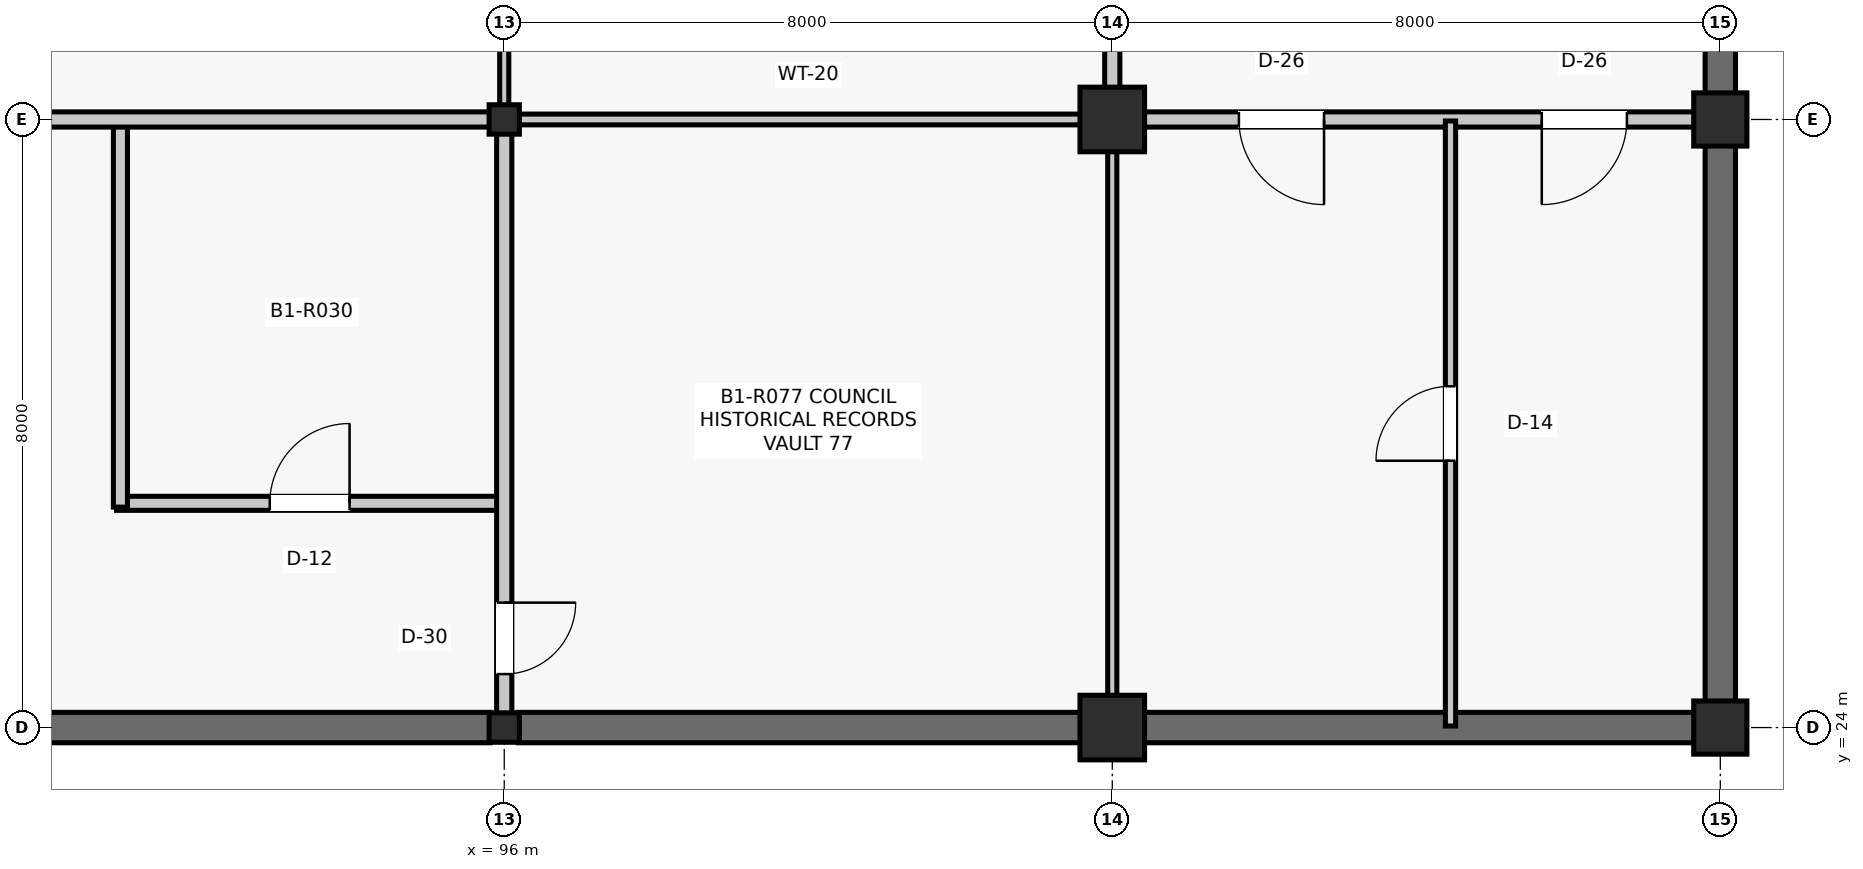
"""IFC4 building model, lengths in metres.
Left out: names, types, materials, properties, quantities, classifications, styles, units other than length and angle.
Written with IfcOpenShell. Run it as: python <this file> out.ifc"""

import sys

from ifc_helpers import new_model, si_unit, direction, frame, frame_2d, origin, origin_2d, place, context, subcontext, project, spatial, rectangle, i_section, extrude, element, fill, save


model = new_model("IFC4")
c1 = context("Model", 3, precision=1e-05, world=origin(), true_north=direction((0.0, 1.0)))
c2 = subcontext(c1, "Body", "Model", "MODEL_VIEW")
j1 = project(units=[si_unit("LENGTHUNIT", "METRE"), si_unit("PLANEANGLEUNIT", "RADIAN")], contexts=[c1])
p1 = place(None, origin())
s1 = spatial("IfcSite", under=j1, at=p1, CompositionType="ELEMENT")
p2 = place(p1, origin())
s2 = spatial("IfcBuilding", under=s1, at=p2, CompositionType="ELEMENT")
p3 = place(p2, frame((0.0, 0.0, -4.29)))
s3 = spatial("IfcBuildingStorey", under=s2, at=p3, CompositionType="ELEMENT", Elevation=-4.29)
for number, where, z_axis, x_axis in (
    (1, (96.0, 24.0, 0.0), (0.0, 0.0, 1.0), (1.0, 0.0, 0.0)),
    (2, (96.0, 32.0, 0.0), (0.0, 0.0, 1.0), (1.0, 0.0, 0.0)),
):
    element("IfcColumn", number, at=place(p3, frame(where, z_axis=z_axis, x_axis=x_axis)), inside=s3, PredefinedType="COLUMN", context=c2, shape_type="SweptSolid", body=[
        extrude(i_section(OverallWidth=0.398, OverallDepth=0.387, WebThickness=0.021, FlangeThickness=0.033, FilletRadius=0.015, at=origin_2d()), origin(), (0.0, 0.0, 1.0), 4.29),
    ])
for number, where, z_axis, x_axis in (
    (3, (104.0, 24.0, 0.0), (0.0, 0.0, 1.0), (1.0, 0.0, 0.0)),
    (4, (104.0, 32.0, 0.0), (0.0, 0.0, 1.0), (1.0, 0.0, 0.0)),
):
    element("IfcColumn", number, at=place(p3, frame(where, z_axis=z_axis, x_axis=x_axis)), inside=s3, PredefinedType="COLUMN", context=c2, shape_type="SweptSolid", body=[
        extrude(rectangle(XDim=0.85, YDim=0.85, at=origin_2d()), origin(), (0.0, 0.0, 1.0), 4.29),
    ])
for number, where, z_axis, x_axis in (
    (5, (112.0, 24.0, 0.0), (0.0, 0.0, 1.0), (1.0, 0.0, 0.0)),
    (6, (112.0, 32.0, 0.0), (0.0, 0.0, 1.0), (1.0, 0.0, 0.0)),
):
    element("IfcColumn", number, at=place(p3, frame(where, z_axis=z_axis, x_axis=x_axis)), inside=s3, PredefinedType="COLUMN", context=c2, shape_type="SweptSolid", body=[
        extrude(rectangle(XDim=0.7, YDim=0.7, at=origin_2d()), origin(), (0.0, 0.0, 1.0), 4.29),
    ])
p4 = place(p3, frame((88.335, 24.0, 0.0), z_axis=(0.0, 0.0, 1.0), x_axis=(1.0, 0.0, 0.0)))
e7 = element("IfcWall", 7, at=p4, inside=s3, PredefinedType="SHEAR", context=c2, shape_type="SweptSolid", body=[
    extrude(rectangle(XDim=7.481, YDim=0.4, at=frame_2d((3.74, 0.0))), origin(), (0.0, 0.0, 1.0), 3.333),
])
p5 = place(p3, frame((96.184, 24.0, 0.0), z_axis=(0.0, 0.0, 1.0), x_axis=(1.0, 0.0, 0.0)))
e8 = element("IfcWall", 8, at=p5, inside=s3, PredefinedType="SHEAR", context=c2, shape_type="SweptSolid", body=[
    extrude(rectangle(XDim=7.406, YDim=0.4, at=frame_2d((3.703, 0.0))), origin(), (0.0, 0.0, 1.0), 3.401),
])
p6 = place(p3, frame((104.41, 24.0, 0.0), z_axis=(0.0, 0.0, 1.0), x_axis=(1.0, 0.0, 0.0)))
e9 = element("IfcWall", 9, at=p6, inside=s3, PredefinedType="SHEAR", context=c2, shape_type="SweptSolid", body=[
    extrude(rectangle(XDim=7.255, YDim=0.4, at=frame_2d((3.627, 0.0))), origin(), (0.0, 0.0, 1.0), 3.324),
])
p7 = place(p3, frame((112.0, 24.335, 0.0), z_axis=(0.0, 0.0, 1.0), x_axis=(0.0, 1.0, 0.0)))
e10 = element("IfcWall", 10, at=p7, inside=s3, PredefinedType="SHEAR", context=c2, shape_type="SweptSolid", body=[
    extrude(rectangle(XDim=7.33, YDim=0.4, at=frame_2d((3.665, 0.0))), origin(), (0.0, 0.0, 1.0), 3.409),
])
p8 = place(p3, frame((112.0, 32.335, 0.0), z_axis=(0.0, 0.0, 1.0), x_axis=(0.0, 1.0, 0.0)))
e11 = element("IfcWall", 11, at=p8, inside=s3, PredefinedType="SHEAR", context=c2, shape_type="SweptSolid", body=[
    extrude(rectangle(XDim=7.33, YDim=0.4, at=frame_2d((3.665, 0.0))), origin(), (0.0, 0.0, 1.0), 3.401),
])
p9 = place(p3, frame((90.9, 26.95, 0.0), z_axis=(0.0, 0.0, 1.0), x_axis=(1.0, 0.0, 0.0)))
e12 = element("IfcWall", 12, at=p9, inside=s3, PredefinedType="PARTITIONING", context=c2, shape_type="SweptSolid", body=[
    extrude(rectangle(XDim=5.08, YDim=0.185, at=frame_2d((2.54, 0.0))), origin(), (0.0, 0.0, 1.0), 3.461),
])
p10 = place(p9, frame((2.015, 0.0, 0.0)))
e13 = element("IfcOpeningElement", 13, at=p10, cuts=e12, PredefinedType="OPENING", context=c2, shape_type="SweptSolid", body=[
    extrude(rectangle(XDim=1.05, YDim=2.15, at=frame_2d((0.525, 1.075))), frame((0.0, 0.103, 0.0), z_axis=(0.0, -1.0, 0.0), x_axis=(1.0, 0.0, 0.0)), (0.0, 0.0, 1.0), 0.205),
])
p11 = place(p3, frame((90.95, 26.9, 0.0), z_axis=(0.0, 0.0, 1.0), x_axis=(0.0, 1.0, 0.0)))
e14 = element("IfcWall", 14, at=p11, inside=s3, PredefinedType="PARTITIONING", context=c2, shape_type="SweptSolid", body=[
    extrude(rectangle(XDim=5.08, YDim=0.185, at=frame_2d((2.54, 0.0))), origin(), (0.0, 0.0, 1.0), 3.394),
])
p12 = place(p3, frame((96.0, 24.184, 0.0), z_axis=(0.0, 0.0, 1.0), x_axis=(0.0, 1.0, 0.0)))
e15 = element("IfcWall", 15, at=p12, inside=s3, PredefinedType="PARTITIONING", context=c2, shape_type="SweptSolid", body=[
    extrude(rectangle(XDim=7.633, YDim=0.2, at=frame_2d((3.816, 0.0))), origin(), (0.0, 0.0, 1.0), 3.461),
])
p13 = place(p12, frame((0.52, 0.0, 0.0)))
e16 = element("IfcOpeningElement", 16, at=p13, cuts=e15, PredefinedType="OPENING", context=c2, shape_type="SweptSolid", body=[
    extrude(rectangle(XDim=0.94, YDim=2.12, at=frame_2d((0.47, 1.06))), frame((0.0, 0.11, 0.0), z_axis=(0.0, -1.0, 0.0), x_axis=(1.0, 0.0, 0.0)), (0.0, 0.0, 1.0), 0.22),
])
p14 = place(p3, frame((88.34, 32.0, 0.0), z_axis=(0.0, 0.0, 1.0), x_axis=(1.0, 0.0, 0.0)))
e17 = element("IfcWall", 17, at=p14, inside=s3, PredefinedType="PARTITIONING", context=c2, shape_type="SweptSolid", body=[
    extrude(rectangle(XDim=7.471, YDim=0.2, at=frame_2d((3.735, 0.0))), origin(), (0.0, 0.0, 1.0), 3.394),
])
p15 = place(p14, frame((0.52, 0.0, 0.0)))
e18 = element("IfcOpeningElement", 18, at=p15, cuts=e17, PredefinedType="OPENING", context=c2, shape_type="SweptSolid", body=[
    extrude(rectangle(XDim=0.94, YDim=2.12, at=frame_2d((0.47, 1.06))), frame((0.0, 0.11, 0.0), z_axis=(0.0, -1.0, 0.0), x_axis=(1.0, 0.0, 0.0)), (0.0, 0.0, 1.0), 0.22),
])
p16 = place(p3, frame((96.0, 32.184, 0.0), z_axis=(0.0, 0.0, 1.0), x_axis=(0.0, 1.0, 0.0)))
e19 = element("IfcWall", 19, at=p16, inside=s3, PredefinedType="PARTITIONING", context=c2, shape_type="SweptSolid", body=[
    extrude(rectangle(XDim=7.633, YDim=0.12, at=frame_2d((3.816, 0.0))), origin(), (0.0, 0.0, 1.0), 3.393),
])
p17 = place(p3, frame((104.0, 24.415, 0.0), z_axis=(0.0, 0.0, 1.0), x_axis=(0.0, 1.0, 0.0)))
e20 = element("IfcWall", 20, at=p17, inside=s3, PredefinedType="PARTITIONING", context=c2, shape_type="SweptSolid", body=[
    extrude(rectangle(XDim=7.17, YDim=0.12, at=frame_2d((3.585, 0.0))), origin(), (0.0, 0.0, 1.0), 3.393),
])
p18 = place(p3, frame((96.189, 32.0, 0.0), z_axis=(0.0, 0.0, 1.0), x_axis=(1.0, 0.0, 0.0)))
e21 = element("IfcWall", 21, at=p18, inside=s3, PredefinedType="PARTITIONING", context=c2, shape_type="SweptSolid", body=[
    extrude(rectangle(XDim=7.396, YDim=0.142, at=frame_2d((3.698, 0.0))), origin(), (0.0, 0.0, 1.0), 3.317),
])
p19 = place(p3, frame((104.0, 32.415, 0.0), z_axis=(0.0, 0.0, 1.0), x_axis=(0.0, 1.0, 0.0)))
e22 = element("IfcWall", 22, at=p19, inside=s3, PredefinedType="PARTITIONING", context=c2, shape_type="SweptSolid", body=[
    extrude(rectangle(XDim=7.17, YDim=0.2, at=frame_2d((3.585, 0.0))), origin(), (0.0, 0.0, 1.0), 3.402),
])
p20 = place(p19, frame((1.167, 0.0, 0.0)))
e23 = element("IfcOpeningElement", 23, at=p20, cuts=e22, PredefinedType="OPENING", context=c2, shape_type="SweptSolid", body=[
    extrude(rectangle(XDim=1.25, YDim=2.18, at=frame_2d((0.625, 1.09))), frame((0.0, 0.11, 0.0), z_axis=(0.0, -1.0, 0.0), x_axis=(1.0, 0.0, 0.0)), (0.0, 0.0, 1.0), 0.22),
])
p21 = place(p19, frame((5.111, 0.0, 0.0)))
e24 = element("IfcOpeningElement", 24, at=p21, cuts=e22, PredefinedType="OPENING", context=c2, shape_type="SweptSolid", body=[
    extrude(rectangle(XDim=1.25, YDim=2.18, at=frame_2d((0.625, 1.09))), frame((0.0, 0.11, 0.0), z_axis=(0.0, -1.0, 0.0), x_axis=(1.0, 0.0, 0.0)), (0.0, 0.0, 1.0), 0.22),
])
p22 = place(p3, frame((104.415, 32.0, 0.0), z_axis=(0.0, 0.0, 1.0), x_axis=(1.0, 0.0, 0.0)))
e25 = element("IfcWall", 25, at=p22, inside=s3, PredefinedType="PARTITIONING", context=c2, shape_type="SweptSolid", body=[
    extrude(rectangle(XDim=7.245, YDim=0.2, at=frame_2d((3.623, 0.0))), origin(), (0.0, 0.0, 1.0), 3.393),
])
p23 = place(p22, frame((1.251, 0.0, 0.0)))
e26 = element("IfcOpeningElement", 26, at=p23, cuts=e25, PredefinedType="OPENING", context=c2, shape_type="SweptSolid", body=[
    extrude(rectangle(XDim=1.12, YDim=2.22, at=frame_2d((0.56, 1.11))), frame((0.0, 0.11, 0.0), z_axis=(0.0, -1.0, 0.0), x_axis=(1.0, 0.0, 0.0)), (0.0, 0.0, 1.0), 0.22),
])
p24 = place(p22, frame((5.236, 0.0, 0.0)))
e27 = element("IfcOpeningElement", 27, at=p24, cuts=e25, PredefinedType="OPENING", context=c2, shape_type="SweptSolid", body=[
    extrude(rectangle(XDim=1.12, YDim=2.22, at=frame_2d((0.56, 1.11))), frame((0.0, 0.11, 0.0), z_axis=(0.0, -1.0, 0.0), x_axis=(1.0, 0.0, 0.0)), (0.0, 0.0, 1.0), 0.22),
])
p25 = place(p3, frame((108.45, 24.02, 0.0), z_axis=(0.0, 0.0, 1.0), x_axis=(0.0, 1.0, 0.0)))
e28 = element("IfcWall", 28, at=p25, inside=s3, PredefinedType="PARTITIONING", context=c2, shape_type="SweptSolid", body=[
    extrude(rectangle(XDim=7.96, YDim=0.135, at=frame_2d((3.98, 0.0))), origin(), (0.0, 0.0, 1.0), 3.317),
])
p26 = place(p25, frame((3.49, 0.0, 0.0)))
e29 = element("IfcOpeningElement", 29, at=p26, cuts=e28, PredefinedType="OPENING", context=c2, shape_type="SweptSolid", body=[
    extrude(rectangle(XDim=0.98, YDim=2.15, at=frame_2d((0.49, 1.075))), frame((0.0, 0.077, 0.0), z_axis=(0.0, -1.0, 0.0), x_axis=(1.0, 0.0, 0.0)), (0.0, 0.0, 1.0), 0.155),
])
p27 = place(p10, origin())
e30 = element("IfcDoor", 30, at=p27, inside=s3, OperationType="SINGLE_SWING_RIGHT", PredefinedType="DOOR", context=c2, shape_type="SweptSolid", body=[
    extrude(rectangle(XDim=1.05, YDim=2.15, at=frame_2d((0.525, 1.075))), frame((0.0, 0.025, 0.0), z_axis=(0.0, -1.0, 0.0), x_axis=(1.0, 0.0, 0.0)), (0.0, 0.0, 1.0), 0.05),
])
fill(e13, e30)
p28 = place(p13, frame((0.94, 0.0, 0.0), z_axis=(0.0, 0.0, 1.0), x_axis=(-1.0, 0.0, 0.0)))
e31 = element("IfcDoor", 31, at=p28, inside=s3, OperationType="SINGLE_SWING_RIGHT", PredefinedType="DOOR", context=c2, shape_type="SweptSolid", body=[
    extrude(rectangle(XDim=0.94, YDim=2.12, at=frame_2d((0.47, 1.06))), frame((0.0, 0.025, 0.0), z_axis=(0.0, -1.0, 0.0), x_axis=(1.0, 0.0, 0.0)), (0.0, 0.0, 1.0), 0.05),
])
fill(e16, e31)
p29 = place(p23, frame((1.12, 0.0, 0.0), z_axis=(0.0, 0.0, 1.0), x_axis=(-1.0, 0.0, 0.0)))
e32 = element("IfcDoor", 32, at=p29, inside=s3, OperationType="SINGLE_SWING_RIGHT", PredefinedType="DOOR", context=c2, shape_type="SweptSolid", body=[
    extrude(rectangle(XDim=1.12, YDim=2.22, at=frame_2d((0.56, 1.11))), frame((0.0, 0.025, 0.0), z_axis=(0.0, -1.0, 0.0), x_axis=(1.0, 0.0, 0.0)), (0.0, 0.0, 1.0), 0.05),
])
fill(e26, e32)
p30 = place(p24, frame((1.12, 0.0, 0.0), z_axis=(0.0, 0.0, 1.0), x_axis=(-1.0, 0.0, 0.0)))
e33 = element("IfcDoor", 33, at=p30, inside=s3, OperationType="SINGLE_SWING_LEFT", PredefinedType="DOOR", context=c2, shape_type="SweptSolid", body=[
    extrude(rectangle(XDim=1.12, YDim=2.22, at=frame_2d((0.56, 1.11))), frame((0.0, 0.025, 0.0), z_axis=(0.0, -1.0, 0.0), x_axis=(1.0, 0.0, 0.0)), (0.0, 0.0, 1.0), 0.05),
])
fill(e27, e33)
p31 = place(p26, origin())
e34 = element("IfcDoor", 34, at=p31, inside=s3, OperationType="SINGLE_SWING_LEFT", PredefinedType="DOOR", context=c2, shape_type="SweptSolid", body=[
    extrude(rectangle(XDim=0.98, YDim=2.15, at=frame_2d((0.49, 1.075))), frame((0.0, 0.025, 0.0), z_axis=(0.0, -1.0, 0.0), x_axis=(1.0, 0.0, 0.0)), (0.0, 0.0, 1.0), 0.05),
])
fill(e29, e34)
save(model, sys.argv[1])
